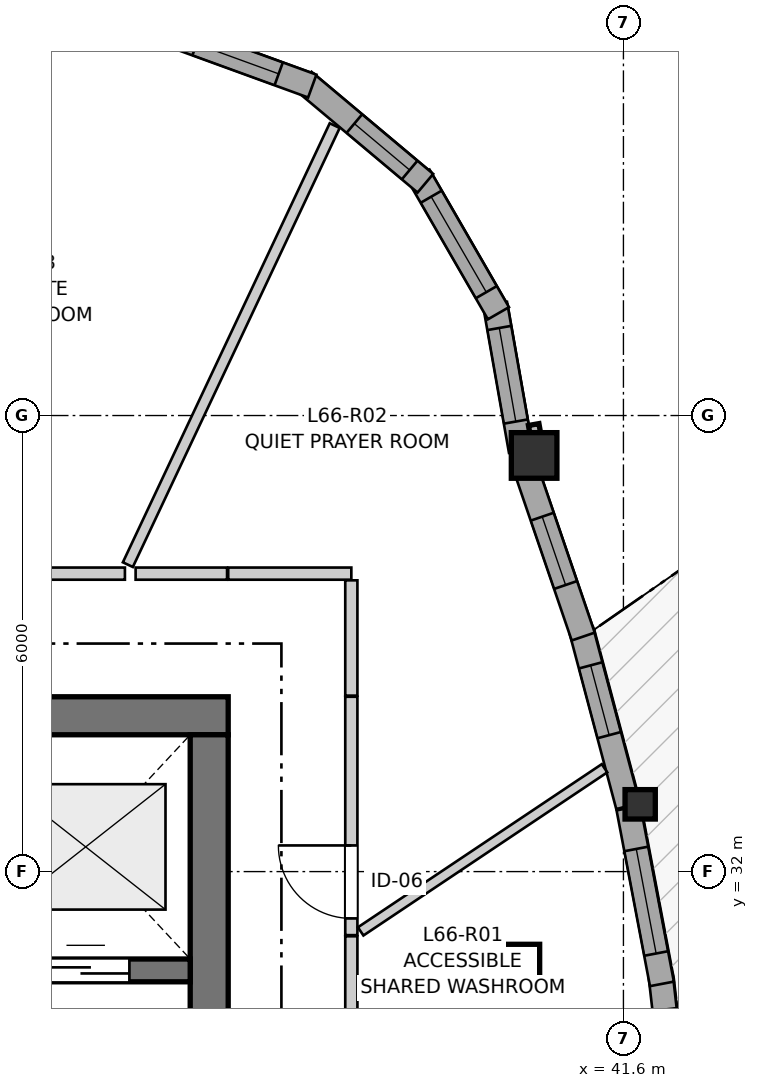
"""IFC4 building model, lengths in metres.
Left out: names, types, materials, properties, quantities, classifications, styles, units other than length and angle.
Written with IfcOpenShell. Run it as: python <this file> out.ifc"""

import sys

from ifc_helpers import new_model, si_unit, direction, frame, frame_2d, origin, origin_2d, place, context, subcontext, project, spatial, rectangle, i_section, extrude, source, transform, mapped, element, fill, save


model = new_model("IFC4")
c1 = context("Model", 3, precision=1e-05, world=origin(), true_north=direction((0.0, 1.0)))
c2 = subcontext(c1, "Body", "Model", "MODEL_VIEW")
j1 = project(units=[si_unit("LENGTHUNIT", "METRE"), si_unit("PLANEANGLEUNIT", "RADIAN")], contexts=[c1])
p1 = place(None, origin())
s1 = spatial("IfcSite", under=j1, at=p1, CompositionType="ELEMENT")
p2 = place(p1, origin())
s2 = spatial("IfcBuilding", under=s1, at=p2, CompositionType="ELEMENT")
p3 = place(p2, frame((0.0, 0.0, 221.2)))
s3 = spatial("IfcBuildingStorey", under=s2, at=p3, CompositionType="ELEMENT", Elevation=221.2)
p4 = place(p3, frame((36.4, 34.05, 0.0), z_axis=(0.0, 0.0, 1.0), x_axis=(-1.0, 0.0, 0.0)))
e1 = element("IfcWall", 1, at=p4, inside=s3, PredefinedType="SHEAR", context=c2, shape_type="SweptSolid", body=[
    extrude(rectangle(XDim=12.1, YDim=0.5, at=frame_2d((6.05, 0.0))), origin(), (0.0, 0.0, 1.0), 2.96),
])
p5 = place(p3, frame((36.15, 18.2, 0.0), z_axis=(0.0, 0.0, 1.0), x_axis=(0.0, 1.0, 0.0)))
e2 = element("IfcWall", 2, at=p5, inside=s3, PredefinedType="SHEAR", context=c2, shape_type="SweptSolid", body=[
    extrude(rectangle(XDim=15.6, YDim=0.5, at=frame_2d((7.8, 0.0))), origin(), (0.0, 0.0, 1.0), 2.96),
])
p6 = place(p5, frame((4.25, 0.0, 0.0)))
e3 = element("IfcOpeningElement", 3, at=p6, cuts=e2, PredefinedType="OPENING", context=c2, shape_type="SweptSolid", body=[
    extrude(rectangle(XDim=1.1, YDim=2.15, at=frame_2d((0.55, 1.075))), frame((0.0, 0.26, 0.0), z_axis=(0.0, -1.0, 0.0), x_axis=(1.0, 0.0, 0.0)), (0.0, 0.0, 1.0), 0.52),
])
p7 = place(p5, frame((10.25, 0.0, 0.0)))
e4 = element("IfcOpeningElement", 4, at=p7, cuts=e2, PredefinedType="OPENING", context=c2, shape_type="SweptSolid", body=[
    extrude(rectangle(XDim=1.1, YDim=2.15, at=frame_2d((0.55, 1.075))), frame((0.0, 0.26, 0.0), z_axis=(0.0, -1.0, 0.0), x_axis=(1.0, 0.0, 0.0)), (0.0, 0.0, 1.0), 0.52),
])
p8 = place(p3, frame((24.8, 30.7, 0.0), z_axis=(0.0, 0.0, 1.0), x_axis=(1.0, 0.0, 0.0)))
e5 = element("IfcWall", 5, at=p8, inside=s3, PredefinedType="SHEAR", context=c2, shape_type="SweptSolid", body=[
    extrude(rectangle(XDim=11.1, YDim=0.3, at=frame_2d((5.55, 0.0))), origin(), (0.0, 0.0, 1.0), 2.96),
])
p9 = place(p8, frame((6.22, 0.0, 0.0)))
e6 = element("IfcOpeningElement", 6, at=p9, cuts=e5, PredefinedType="OPENING", context=c2, shape_type="SweptSolid", body=[
    extrude(rectangle(XDim=0.98, YDim=2.15, at=frame_2d((0.49, 1.075))), frame((0.0, 0.16, 0.0), z_axis=(0.0, -1.0, 0.0), x_axis=(1.0, 0.0, 0.0)), (0.0, 0.0, 1.0), 0.32),
])
p10 = place(p8, frame((9.15, 0.0, 0.0)))
e7 = element("IfcOpeningElement", 7, at=p10, cuts=e5, PredefinedType="OPENING", context=c2, shape_type="SweptSolid", body=[
    extrude(rectangle(XDim=1.15, YDim=2.15, at=frame_2d((0.575, 1.075))), frame((0.0, 0.16, 0.0), z_axis=(0.0, -1.0, 0.0), x_axis=(1.0, 0.0, 0.0)), (0.0, 0.0, 1.0), 0.32),
])
m1 = source(origin(), c2, "Body", "SweptSolid", [
    extrude(i_section(OverallWidth=0.398, OverallDepth=0.387, WebThickness=0.019, FlangeThickness=0.03, FilletRadius=0.015, at=origin_2d()), origin(), (0.0, 0.0, 1.0), 2.96),
])
p11 = place(p3, frame((41.82, 32.885, 0.0), z_axis=(0.0, 0.0, 1.0), x_axis=(1.0, 0.0, 0.0)))
e8 = element("IfcColumn", 8, at=p11, inside=s3, PredefinedType="PILASTER", context=c2, shape_type="MappedRepresentation", body=[
    mapped(m1, transform((0.0, 0.0, 0.0), x_axis=(1.0, 0.0, 0.0), y_axis=(0.0, 1.0, 0.0), z_axis=(0.0, 0.0, 1.0), scale=1.0)),
])
m2 = source(origin(), c2, "Body", "SweptSolid", [
    extrude(rectangle(XDim=0.6, YDim=0.6, at=origin_2d()), origin(), (0.0, 0.0, 1.0), 2.96),
])
p12 = place(p3, frame((40.425, 37.475, 0.0), z_axis=(0.0, 0.0, 1.0), x_axis=(1.0, 0.0, 0.0)))
e9 = element("IfcColumn", 9, at=p12, inside=s3, PredefinedType="COLUMN", context=c2, shape_type="MappedRepresentation", body=[
    mapped(m2, transform((0.0, 0.0, 0.0), x_axis=(1.0, 0.0, 0.0), y_axis=(0.0, 1.0, 0.0), z_axis=(0.0, 0.0, 1.0), scale=1.0)),
])
p13 = place(p3, frame((42.349, 28.366, 0.0), z_axis=(0.0, 0.0, 1.0), x_axis=(-0.113314829757, 0.99355913229, 0.0)))
e10 = element("IfcWall", 10, at=p13, inside=s3, PredefinedType="SOLIDWALL", context=c2, shape_type="SweptSolid", body=[
    extrude(rectangle(XDim=2.258, YDim=0.32, at=frame_2d((1.129, 0.0))), origin(), (0.0, 0.0, 1.0), 2.58),
])
p14 = place(p13, frame((0.83, 0.0, 0.0)))
e11 = element("IfcOpeningElement", 11, at=p14, cuts=e10, PredefinedType="OPENING", context=c2, shape_type="SweptSolid", body=[
    extrude(rectangle(XDim=1.0, YDim=2.1, at=frame_2d((0.5, 1.05))), frame((0.0, 0.17, 0.0), z_axis=(0.0, -1.0, 0.0), x_axis=(1.0, 0.0, 0.0)), (0.0, 0.0, 1.0), 0.34),
])
p15 = place(p3, frame((42.106, 30.523, 0.0), z_axis=(0.0, 0.0, 1.0), x_axis=(-0.186673658051, 0.982421979289, 0.0)))
e12 = element("IfcWall", 12, at=p15, inside=s3, PredefinedType="SOLIDWALL", context=c2, shape_type="SweptSolid", body=[
    extrude(rectangle(XDim=2.354, YDim=0.32, at=frame_2d((1.177, 0.0))), origin(), (0.0, 0.0, 1.0), 2.58),
])
p16 = place(p15, frame((0.407, 0.0, 0.82)))
e13 = element("IfcOpeningElement", 13, at=p16, cuts=e12, PredefinedType="OPENING", context=c2, shape_type="SweptSolid", body=[
    extrude(rectangle(XDim=1.4, YDim=1.35, at=frame_2d((0.7, 0.675))), frame((0.0, 0.17, 0.0), z_axis=(0.0, -1.0, 0.0), x_axis=(1.0, 0.0, 0.0)), (0.0, 0.0, 1.0), 0.34),
])
p17 = place(p3, frame((41.66, 32.863, 0.0), z_axis=(0.0, 0.0, 1.0), x_axis=(-0.257008511659, 0.966409139513, 0.0)))
e14 = element("IfcWall", 14, at=p17, inside=s3, PredefinedType="SOLIDWALL", context=c2, shape_type="SweptSolid", body=[
    extrude(rectangle(XDim=2.393, YDim=0.32, at=frame_2d((1.196, 0.0))), origin(), (0.0, 0.0, 1.0), 2.58),
])
p18 = place(p17, frame((0.965, 0.0, 0.82)))
e15 = element("IfcOpeningElement", 15, at=p18, cuts=e14, PredefinedType="OPENING", context=c2, shape_type="SweptSolid", body=[
    extrude(rectangle(XDim=0.95, YDim=1.35, at=frame_2d((0.475, 0.675))), frame((0.0, 0.17, 0.0), z_axis=(0.0, -1.0, 0.0), x_axis=(1.0, 0.0, 0.0)), (0.0, 0.0, 1.0), 0.34),
])
p19 = place(p3, frame((41.071, 35.092, 0.0), z_axis=(0.0, 0.0, 1.0), x_axis=(-0.323624668926, 0.946185538709, 0.0)))
e16 = element("IfcWall", 16, at=p19, inside=s3, PredefinedType="SOLIDWALL", context=c2, shape_type="SweptSolid", body=[
    extrude(rectangle(XDim=2.373, YDim=0.32, at=frame_2d((1.187, 0.0))), origin(), (0.0, 0.0, 1.0), 2.58),
])
p20 = place(p19, frame((0.717, 0.0, 0.82)))
e17 = element("IfcOpeningElement", 17, at=p20, cuts=e16, PredefinedType="OPENING", context=c2, shape_type="SweptSolid", body=[
    extrude(rectangle(XDim=0.95, YDim=1.35, at=frame_2d((0.475, 0.675))), frame((0.0, 0.17, 0.0), z_axis=(0.0, -1.0, 0.0), x_axis=(1.0, 0.0, 0.0)), (0.0, 0.0, 1.0), 0.34),
])
p21 = place(p3, frame((40.252, 37.536, 0.0), z_axis=(0.0, 0.0, 1.0), x_axis=(-0.173671780312, 0.984803590937, 0.0)))
e18 = element("IfcWall", 18, at=p21, inside=s3, PredefinedType="SOLIDWALL", context=c2, shape_type="SweptSolid", body=[
    extrude(rectangle(XDim=1.962, YDim=0.32, at=frame_2d((0.981, 0.0))), origin(), (0.0, 0.0, 1.0), 2.58),
])
p22 = place(p21, frame((0.391, 0.0, 0.82)))
e19 = element("IfcOpeningElement", 19, at=p22, cuts=e18, PredefinedType="OPENING", context=c2, shape_type="SweptSolid", body=[
    extrude(rectangle(XDim=1.25, YDim=1.35, at=frame_2d((0.625, 0.675))), frame((0.0, 0.17, 0.0), z_axis=(0.0, -1.0, 0.0), x_axis=(1.0, 0.0, 0.0)), (0.0, 0.0, 1.0), 0.34),
])
p23 = place(p3, frame((39.956, 39.346, 0.0), z_axis=(0.0, 0.0, 1.0), x_axis=(-0.499995423472, 0.866028046028, 0.0)))
e20 = element("IfcWall", 20, at=p23, inside=s3, PredefinedType="SOLIDWALL", context=c2, shape_type="SweptSolid", body=[
    extrude(rectangle(XDim=2.09, YDim=0.32, at=frame_2d((1.045, 0.0))), origin(), (0.0, 0.0, 1.0), 2.58),
])
p24 = place(p23, frame((0.32, 0.0, 0.82)))
e21 = element("IfcOpeningElement", 21, at=p24, cuts=e20, PredefinedType="OPENING", context=c2, shape_type="SweptSolid", body=[
    extrude(rectangle(XDim=1.45, YDim=1.25, at=frame_2d((0.725, 0.625))), frame((0.0, 0.17, 0.0), z_axis=(0.0, -1.0, 0.0), x_axis=(1.0, 0.0, 0.0)), (0.0, 0.0, 1.0), 0.34),
])
p25 = place(p3, frame((38.994, 41.056, 0.0), z_axis=(0.0, 0.0, 1.0), x_axis=(-0.766024572719, 0.642811289563, 0.0)))
e22 = element("IfcWall", 22, at=p25, inside=s3, PredefinedType="SOLIDWALL", context=c2, shape_type="SweptSolid", body=[
    extrude(rectangle(XDim=2.09, YDim=0.32, at=frame_2d((1.045, 0.0))), origin(), (0.0, 0.0, 1.0), 2.58),
])
p26 = place(p25, frame((0.271, 0.0, 0.82)))
e23 = element("IfcOpeningElement", 23, at=p26, cuts=e22, PredefinedType="OPENING", context=c2, shape_type="SweptSolid", body=[
    extrude(rectangle(XDim=0.95, YDim=1.35, at=frame_2d((0.475, 0.675))), frame((0.0, 0.17, 0.0), z_axis=(0.0, -1.0, 0.0), x_axis=(1.0, 0.0, 0.0)), (0.0, 0.0, 1.0), 0.34),
])
p27 = place(p3, frame((37.506, 42.334, 0.0), z_axis=(0.0, 0.0, 1.0), x_axis=(-0.939711556618, 0.341968113072, 0.0)))
e24 = element("IfcWall", 24, at=p27, inside=s3, PredefinedType="SOLIDWALL", context=c2, shape_type="SweptSolid", body=[
    extrude(rectangle(XDim=2.09, YDim=0.32, at=frame_2d((1.045, 0.0))), origin(), (0.0, 0.0, 1.0), 2.58),
])
p28 = place(p27, frame((0.47, 0.0, 0.82)))
e25 = element("IfcOpeningElement", 25, at=p28, cuts=e24, PredefinedType="OPENING", context=c2, shape_type="SweptSolid", body=[
    extrude(rectangle(XDim=1.15, YDim=1.2, at=frame_2d((0.575, 0.6))), frame((0.0, 0.17, 0.0), z_axis=(0.0, -1.0, 0.0), x_axis=(1.0, 0.0, 0.0)), (0.0, 0.0, 1.0), 0.34),
])
p29 = place(p3, frame((29.938, 35.92, 0.0), z_axis=(0.0, 0.0, 1.0), x_axis=(1.0, 0.0, 0.0)))
e26 = element("IfcWall", 26, at=p29, inside=s3, PredefinedType="PARTITIONING", context=c2, shape_type="SweptSolid", body=[
    extrude(rectangle(XDim=5.103, YDim=0.16, at=frame_2d((2.552, 0.0))), origin(), (0.0, 0.0, 1.0), 2.96),
])
p30 = place(p29, frame((1.878, 0.0, 0.0)))
e27 = element("IfcOpeningElement", 27, at=p30, cuts=e26, PredefinedType="OPENING", context=c2, shape_type="SweptSolid", body=[
    extrude(rectangle(XDim=1.3, YDim=2.1, at=frame_2d((0.65, 1.05))), frame((0.0, 0.09, 0.0), z_axis=(0.0, -1.0, 0.0), x_axis=(1.0, 0.0, 0.0)), (0.0, 0.0, 1.0), 0.18),
])
p31 = place(p3, frame((38.02, 31.149, 0.0), z_axis=(0.0, 0.0, 1.0), x_axis=(0.0, -1.0, 0.0)))
e28 = element("IfcWall", 28, at=p31, inside=s3, PredefinedType="PARTITIONING", context=c2, shape_type="SweptSolid", body=[
    extrude(rectangle(XDim=3.279, YDim=0.16, at=frame_2d((1.639, 0.0))), origin(), (0.0, 0.0, 1.0), 2.628),
])
p32 = place(p31, frame((2.109, 0.0, 0.0)))
e29 = element("IfcOpeningElement", 29, at=p32, cuts=e28, PredefinedType="OPENING", context=c2, shape_type="SweptSolid", body=[
    extrude(rectangle(XDim=0.95, YDim=2.1, at=frame_2d((0.475, 1.05))), frame((0.0, 0.09, 0.0), z_axis=(0.0, -1.0, 0.0), x_axis=(1.0, 0.0, 0.0)), (0.0, 0.0, 1.0), 0.18),
])
p33 = place(p3, frame((38.02, 31.164, 0.0), z_axis=(0.0, 0.0, 1.0), x_axis=(0.0, 1.0, 0.0)))
e30 = element("IfcWall", 30, at=p33, inside=s3, PredefinedType="PARTITIONING", context=c2, shape_type="SweptSolid", body=[
    extrude(rectangle(XDim=3.136, YDim=0.16, at=frame_2d((1.568, 0.0))), origin(), (0.0, 0.0, 1.0), 2.628),
])
p34 = place(p33, frame((0.22, 0.0, 0.0)))
e31 = element("IfcOpeningElement", 31, at=p34, cuts=e30, PredefinedType="OPENING", context=c2, shape_type="SweptSolid", body=[
    extrude(rectangle(XDim=0.96, YDim=2.1, at=frame_2d((0.48, 1.05))), frame((0.0, 0.09, 0.0), z_axis=(0.0, -1.0, 0.0), x_axis=(1.0, 0.0, 0.0)), (0.0, 0.0, 1.0), 0.18),
])
p35 = place(p3, frame((35.08, 36.038, 0.0), z_axis=(0.0, 0.0, 1.0), x_axis=(0.426214985607, 0.904621902258, 0.0)))
e32 = element("IfcWall", 32, at=p35, inside=s3, PredefinedType="PARTITIONING", context=c2, shape_type="SweptSolid", body=[
    extrude(rectangle(XDim=6.385, YDim=0.145, at=frame_2d((3.192, 0.0))), origin(), (0.0, 0.0, 1.0), 2.96),
])
p36 = place(p3, frame((38.143, 31.213, 0.0), z_axis=(0.0, 0.0, 1.0), x_axis=(0.831154063558, 0.556042195009, 0.0)))
e33 = element("IfcWall", 33, at=p36, inside=s3, PredefinedType="PARTITIONING", context=c2, shape_type="SweptSolid", body=[
    extrude(rectangle(XDim=3.86, YDim=0.13, at=frame_2d((1.93, 0.0))), origin(), (0.0, 0.0, 1.0), 2.96),
])
p37 = place(p3, frame((36.4, 35.92, 0.0), z_axis=(0.0, 0.0, 1.0), x_axis=(1.0, 0.0, 0.0)))
e34 = element("IfcWall", 34, at=p37, inside=s3, PredefinedType="PARTITIONING", context=c2, shape_type="SweptSolid", body=[
    extrude(rectangle(XDim=1.62, YDim=0.16, at=frame_2d((0.81, 0.0))), origin(), (0.0, 0.0, 1.0), 2.598),
])
p38 = place(p3, frame((38.02, 34.315, 0.0), z_axis=(0.0, 0.0, 1.0), x_axis=(0.0, 1.0, 0.0)))
e35 = element("IfcWall", 35, at=p38, inside=s3, PredefinedType="PARTITIONING", context=c2, shape_type="SweptSolid", body=[
    extrude(rectangle(XDim=1.517, YDim=0.16, at=frame_2d((0.759, 0.0))), origin(), (0.0, 0.0, 1.0), 2.96),
])
p39 = place(p3, frame((35.182, 35.92, 0.0), z_axis=(0.0, 0.0, 1.0), x_axis=(1.0, 0.0, 0.0)))
e36 = element("IfcWall", 36, at=p39, inside=s3, PredefinedType="PARTITIONING", context=c2, shape_type="SweptSolid", body=[
    extrude(rectangle(XDim=1.203, YDim=0.16, at=frame_2d((0.602, 0.0))), origin(), (0.0, 0.0, 1.0), 2.598),
])
m3 = source(origin(), c2, "Body", "SweptSolid", [
    extrude(rectangle(XDim=1.4, YDim=1.35, at=frame_2d((0.7, 0.675))), frame((0.0, 0.03, 0.0), z_axis=(0.0, -1.0, 0.0), x_axis=(1.0, 0.0, 0.0)), (0.0, 0.0, 1.0), 0.06),
])
p40 = place(p16, origin())
e37 = element("IfcWindow", 37, at=p40, inside=s3, PartitioningType="SINGLE_PANEL", PredefinedType="WINDOW", context=c2, shape_type="MappedRepresentation", body=[
    mapped(m3, transform((0.0, 0.0, 0.0), x_axis=(1.0, 0.0, 0.0), y_axis=(0.0, 1.0, 0.0), z_axis=(0.0, 0.0, 1.0), scale=1.0)),
])
fill(e13, e37)
m4 = source(origin(), c2, "Body", "SweptSolid", [
    extrude(rectangle(XDim=0.95, YDim=1.35, at=frame_2d((0.475, 0.675))), frame((0.0, 0.03, 0.0), z_axis=(0.0, -1.0, 0.0), x_axis=(1.0, 0.0, 0.0)), (0.0, 0.0, 1.0), 0.06),
])
p41 = place(p18, origin())
e38 = element("IfcWindow", 38, at=p41, inside=s3, PartitioningType="SINGLE_PANEL", PredefinedType="WINDOW", context=c2, shape_type="MappedRepresentation", body=[
    mapped(m4, transform((0.0, 0.0, 0.0), x_axis=(1.0, 0.0, 0.0), y_axis=(0.0, 1.0, 0.0), z_axis=(0.0, 0.0, 1.0), scale=1.0)),
])
fill(e15, e38)
p42 = place(p20, origin())
e39 = element("IfcWindow", 39, at=p42, inside=s3, PartitioningType="SINGLE_PANEL", PredefinedType="WINDOW", context=c2, shape_type="MappedRepresentation", body=[
    mapped(m4, transform((0.0, 0.0, 0.0), x_axis=(1.0, 0.0, 0.0), y_axis=(0.0, 1.0, 0.0), z_axis=(0.0, 0.0, 1.0), scale=1.0)),
])
fill(e17, e39)
m5 = source(origin(), c2, "Body", "SweptSolid", [
    extrude(rectangle(XDim=1.25, YDim=1.35, at=frame_2d((0.625, 0.675))), frame((0.0, 0.03, 0.0), z_axis=(0.0, -1.0, 0.0), x_axis=(1.0, 0.0, 0.0)), (0.0, 0.0, 1.0), 0.06),
])
p43 = place(p22, origin())
e40 = element("IfcWindow", 40, at=p43, inside=s3, PartitioningType="SINGLE_PANEL", PredefinedType="WINDOW", context=c2, shape_type="MappedRepresentation", body=[
    mapped(m5, transform((0.0, 0.0, 0.0), x_axis=(1.0, 0.0, 0.0), y_axis=(0.0, 1.0, 0.0), z_axis=(0.0, 0.0, 1.0), scale=1.0)),
])
fill(e19, e40)
m6 = source(origin(), c2, "Body", "SweptSolid", [
    extrude(rectangle(XDim=1.45, YDim=1.25, at=frame_2d((0.725, 0.625))), frame((0.0, 0.03, 0.0), z_axis=(0.0, -1.0, 0.0), x_axis=(1.0, 0.0, 0.0)), (0.0, 0.0, 1.0), 0.06),
])
p44 = place(p24, origin())
e41 = element("IfcWindow", 41, at=p44, inside=s3, PartitioningType="SINGLE_PANEL", PredefinedType="WINDOW", context=c2, shape_type="MappedRepresentation", body=[
    mapped(m6, transform((0.0, 0.0, 0.0), x_axis=(1.0, 0.0, 0.0), y_axis=(0.0, 1.0, 0.0), z_axis=(0.0, 0.0, 1.0), scale=1.0)),
])
fill(e21, e41)
p45 = place(p26, origin())
e42 = element("IfcWindow", 42, at=p45, inside=s3, PartitioningType="SINGLE_PANEL", PredefinedType="WINDOW", context=c2, shape_type="MappedRepresentation", body=[
    mapped(m4, transform((0.0, 0.0, 0.0), x_axis=(1.0, 0.0, 0.0), y_axis=(0.0, 1.0, 0.0), z_axis=(0.0, 0.0, 1.0), scale=1.0)),
])
fill(e23, e42)
m7 = source(origin(), c2, "Body", "SweptSolid", [
    extrude(rectangle(XDim=1.15, YDim=1.2, at=frame_2d((0.575, 0.6))), frame((0.0, 0.03, 0.0), z_axis=(0.0, -1.0, 0.0), x_axis=(1.0, 0.0, 0.0)), (0.0, 0.0, 1.0), 0.06),
])
p46 = place(p28, origin())
e43 = element("IfcWindow", 43, at=p46, inside=s3, PartitioningType="SINGLE_PANEL", PredefinedType="WINDOW", context=c2, shape_type="MappedRepresentation", body=[
    mapped(m7, transform((0.0, 0.0, 0.0), x_axis=(1.0, 0.0, 0.0), y_axis=(0.0, 1.0, 0.0), z_axis=(0.0, 0.0, 1.0), scale=1.0)),
])
fill(e25, e43)
m8 = source(origin(), c2, "Body", "SweptSolid", [
    extrude(rectangle(XDim=1.15, YDim=2.15, at=frame_2d((0.575, 1.075))), frame((0.0, 0.025, 0.0), z_axis=(0.0, -1.0, 0.0), x_axis=(1.0, 0.0, 0.0)), (0.0, 0.0, 1.0), 0.05),
])
p47 = place(p10, origin())
e44 = element("IfcDoor", 44, at=p47, inside=s3, OperationType="DOUBLE_DOOR_SLIDING", PredefinedType="DOOR", context=c2, shape_type="MappedRepresentation", body=[
    mapped(m8, transform((0.0, 0.0, 0.0), x_axis=(1.0, 0.0, 0.0), y_axis=(0.0, 1.0, 0.0), z_axis=(0.0, 0.0, 1.0), scale=1.0)),
])
fill(e7, e44)
m9 = source(origin(), c2, "Body", "SweptSolid", [
    extrude(rectangle(XDim=0.96, YDim=2.1, at=frame_2d((0.48, 1.05))), frame((0.0, 0.025, 0.0), z_axis=(0.0, -1.0, 0.0), x_axis=(1.0, 0.0, 0.0)), (0.0, 0.0, 1.0), 0.05),
])
p48 = place(p34, origin())
e45 = element("IfcDoor", 45, at=p48, inside=s3, OperationType="SINGLE_SWING_RIGHT", PredefinedType="DOOR", context=c2, shape_type="MappedRepresentation", body=[
    mapped(m9, transform((0.0, 0.0, 0.0), x_axis=(1.0, 0.0, 0.0), y_axis=(0.0, 1.0, 0.0), z_axis=(0.0, 0.0, 1.0), scale=1.0)),
])
fill(e31, e45)
save(model, sys.argv[1])
